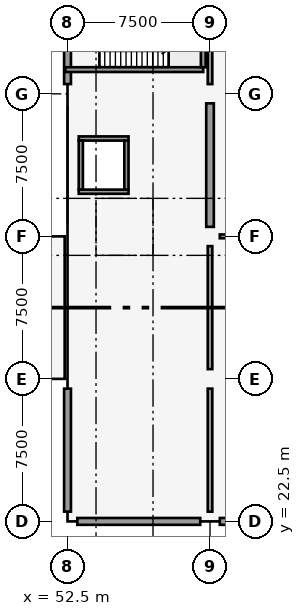
"""IFC4 building model, lengths in metres.
Left out: names, types, materials, properties, quantities, classifications, styles, units other than length and angle.
Written with IfcOpenShell. Run it as: python <this file> out.ifc"""

import sys

from ifc_helpers import new_model, si_unit, direction, frame, frame_2d, origin, origin_2d, place, context, subcontext, project, spatial, rectangle, extrude, element, fill, save


model = new_model("IFC4")
c1 = context("Model", 3, precision=1e-05, world=origin(), true_north=direction((0.0, 1.0)))
c2 = subcontext(c1, "Body", "Model", "MODEL_VIEW")
j1 = project(units=[si_unit("LENGTHUNIT", "METRE"), si_unit("PLANEANGLEUNIT", "RADIAN")], contexts=[c1])
p1 = place(None, origin())
s1 = spatial("IfcSite", under=j1, at=p1, CompositionType="ELEMENT")
p2 = place(p1, origin())
s2 = spatial("IfcBuilding", under=s1, at=p2, CompositionType="ELEMENT")
p3 = place(p2, origin())
s3 = spatial("IfcBuildingStorey", under=s2, at=p3, CompositionType="ELEMENT", Elevation=0.0)
for number, where, z_axis, x_axis in (
    (1, (52.5, 22.5, 0.0), (0.0, 0.0, 1.0), (1.0, 0.0, 0.0)),
    (2, (52.5, 30.0, 0.0), (0.0, 0.0, 1.0), (1.0, 0.0, 0.0)),
    (3, (52.5, 37.5, 0.0), (0.0, 0.0, 1.0), (1.0, 0.0, 0.0)),
    (4, (52.5, 45.0, 0.0), (0.0, 0.0, 1.0), (1.0, 0.0, 0.0)),
    (5, (60.0, 22.5, 0.0), (0.0, 0.0, 1.0), (1.0, 0.0, 0.0)),
    (6, (60.0, 30.0, 0.0), (0.0, 0.0, 1.0), (1.0, 0.0, 0.0)),
    (7, (60.0, 37.5, 0.0), (0.0, 0.0, 1.0), (1.0, 0.0, 0.0)),
    (8, (60.0, 45.0, 0.0), (0.0, 0.0, 1.0), (1.0, 0.0, 0.0)),
):
    element("IfcColumn", number, at=place(p3, frame(where, z_axis=z_axis, x_axis=x_axis)), inside=s3, PredefinedType="COLUMN", context=c2, shape_type="SweptSolid", body=[
        extrude(rectangle(XDim=1.0, YDim=1.0, at=origin_2d()), origin(), (0.0, 0.0, 1.0), 4.8),
    ])
p4 = place(p3, frame((60.0, 38.0, 0.0), z_axis=(0.0, 0.0, 1.0), x_axis=(0.0, 1.0, 0.0)))
e9 = element("IfcWall", 9, at=p4, inside=s3, PredefinedType="SHEAR", context=c2, shape_type="SweptSolid", body=[
    extrude(rectangle(XDim=6.5, YDim=0.4, at=frame_2d((3.25, 0.0))), origin(), (0.0, 0.0, 1.0), 3.0),
])
p5 = place(p3, frame((53.015, 22.5, 0.0), z_axis=(0.0, 0.0, 1.0), x_axis=(1.0, 0.0, 0.0)))
e10 = element("IfcWall", 10, at=p5, inside=s3, PredefinedType="SOLIDWALL", context=c2, shape_type="SweptSolid", body=[
    extrude(rectangle(XDim=6.47, YDim=0.36, at=frame_2d((3.235, 0.0))), origin(), (0.0, 0.0, 1.0), 3.72),
])
p6 = place(p5, frame((2.235, 0.0, 0.0)))
e11 = element("IfcOpeningElement", 11, at=p6, cuts=e10, PredefinedType="OPENING", context=c2, shape_type="SweptSolid", body=[
    extrude(rectangle(XDim=2.0, YDim=2.2, at=frame_2d((1.0, 1.1))), frame((0.0, 0.19, 0.0), z_axis=(0.0, -1.0, 0.0), x_axis=(1.0, 0.0, 0.0)), (0.0, 0.0, 1.0), 0.38),
])
p7 = place(p3, frame((60.515, 22.5, 0.0), z_axis=(0.0, 0.0, 1.0), x_axis=(1.0, 0.0, 0.0)))
e12 = element("IfcWall", 12, at=p7, inside=s3, PredefinedType="SOLIDWALL", context=c2, shape_type="SweptSolid", body=[
    extrude(rectangle(XDim=6.52, YDim=0.36, at=frame_2d((3.26, 0.0))), origin(), (0.0, 0.0, 1.0), 3.72),
])
p8 = place(p7, frame((2.235, 0.0, 0.0)))
e13 = element("IfcOpeningElement", 13, at=p8, cuts=e12, PredefinedType="OPENING", context=c2, shape_type="SweptSolid", body=[
    extrude(rectangle(XDim=2.0, YDim=2.2, at=frame_2d((1.0, 1.1))), frame((0.0, 0.19, 0.0), z_axis=(0.0, -1.0, 0.0), x_axis=(1.0, 0.0, 0.0)), (0.0, 0.0, 1.0), 0.38),
])
p9 = place(p3, frame((52.5, 23.015, 0.0), z_axis=(0.0, 0.0, 1.0), x_axis=(0.0, 1.0, 0.0)))
e14 = element("IfcWall", 14, at=p9, inside=s3, PredefinedType="SOLIDWALL", context=c2, shape_type="SweptSolid", body=[
    extrude(rectangle(XDim=6.47, YDim=0.36, at=frame_2d((3.235, 0.0))), origin(), (0.0, 0.0, 1.0), 3.42),
])
p10 = place(p9, frame((1.12, 0.0, 0.6)))
e15 = element("IfcOpeningElement", 15, at=p10, cuts=e14, PredefinedType="OPENING", context=c2, shape_type="SweptSolid", body=[
    extrude(rectangle(XDim=1.1, YDim=1.8, at=frame_2d((0.55, 0.9))), frame((0.0, 0.19, 0.0), z_axis=(0.0, -1.0, 0.0), x_axis=(1.0, 0.0, 0.0)), (0.0, 0.0, 1.0), 0.38),
])
p11 = place(p9, frame((4.15, 0.0, 0.6)))
e16 = element("IfcOpeningElement", 16, at=p11, cuts=e14, PredefinedType="OPENING", context=c2, shape_type="SweptSolid", body=[
    extrude(rectangle(XDim=1.3, YDim=1.3, at=frame_2d((0.65, 0.65))), frame((0.0, 0.19, 0.0), z_axis=(0.0, -1.0, 0.0), x_axis=(1.0, 0.0, 0.0)), (0.0, 0.0, 1.0), 0.38),
])
p12 = place(p3, frame((52.5, 45.515, 0.0), z_axis=(0.0, 0.0, 1.0), x_axis=(0.0, 1.0, 0.0)))
e17 = element("IfcWall", 17, at=p12, inside=s3, PredefinedType="SOLIDWALL", context=c2, shape_type="SweptSolid", body=[
    extrude(rectangle(XDim=6.47, YDim=0.36, at=frame_2d((3.235, 0.0))), origin(), (0.0, 0.0, 1.0), 3.67),
])
p13 = place(p12, frame((2.022, 0.0, 0.0)))
e18 = element("IfcOpeningElement", 18, at=p13, cuts=e17, PredefinedType="OPENING", context=c2, shape_type="SweptSolid", body=[
    extrude(rectangle(XDim=1.8, YDim=2.2, at=frame_2d((0.9, 1.1))), frame((0.0, 0.19, 0.0), z_axis=(0.0, -1.0, 0.0), x_axis=(1.0, 0.0, 0.0)), (0.0, 0.0, 1.0), 0.38),
])
p14 = place(p3, frame((52.38, 46.275, 0.0), z_axis=(0.0, 0.0, 1.0), x_axis=(1.0, 0.0, 0.0)))
e19 = element("IfcWall", 19, at=p14, inside=s3, PredefinedType="SOLIDWALL", context=c2, shape_type="SweptSolid", body=[
    extrude(rectangle(XDim=7.26, YDim=0.25, at=frame_2d((3.63, 0.0))), origin(), (0.0, 0.0, 1.0), 4.5),
])
p15 = place(p14, frame((0.62, 0.0, 0.0)))
e20 = element("IfcOpeningElement", 20, at=p15, cuts=e19, PredefinedType="OPENING", context=c2, shape_type="SweptSolid", body=[
    extrude(rectangle(XDim=1.1, YDim=2.15, at=frame_2d((0.55, 1.075))), frame((0.0, 0.135, 0.0), z_axis=(0.0, -1.0, 0.0), x_axis=(1.0, 0.0, 0.0)), (0.0, 0.0, 1.0), 0.27),
])
p16 = place(p3, frame((59.645, 46.4, 0.0), z_axis=(0.0, 0.0, 1.0), x_axis=(0.0, 1.0, 0.0)))
e21 = element("IfcWall", 21, at=p16, inside=s3, PredefinedType="SOLIDWALL", context=c2, shape_type="SweptSolid", body=[
    extrude(rectangle(XDim=3.56, YDim=0.25, at=frame_2d((1.78, 0.0))), origin(), (0.0, 0.0, 1.0), 4.5),
])
for number, where, z_axis, x_axis in (
    (22, (53.09, 39.85, 0.0), (0.0, 0.0, 1.0), (1.0, 0.0, 0.0)),
    (23, (53.09, 42.65, 0.0), (0.0, 0.0, 1.0), (1.0, 0.0, 0.0)),
):
    element("IfcWall", number, at=place(p3, frame(where, z_axis=z_axis, x_axis=x_axis)), inside=s3, PredefinedType="SOLIDWALL", context=c2, shape_type="SweptSolid", body=[
        extrude(rectangle(XDim=2.62, YDim=0.22, at=frame_2d((1.31, 0.0))), origin(), (0.0, 0.0, 1.0), 4.5),
    ])
p17 = place(p3, frame((53.2, 39.96, 0.0), z_axis=(0.0, 0.0, 1.0), x_axis=(0.0, 1.0, 0.0)))
e24 = element("IfcWall", 24, at=p17, inside=s3, PredefinedType="SOLIDWALL", context=c2, shape_type="SweptSolid", body=[
    extrude(rectangle(XDim=2.58, YDim=0.22, at=frame_2d((1.29, 0.0))), origin(), (0.0, 0.0, 1.0), 4.5),
])
p18 = place(p3, frame((55.6, 39.96, 0.0), z_axis=(0.0, 0.0, 1.0), x_axis=(0.0, 1.0, 0.0)))
e25 = element("IfcWall", 25, at=p18, inside=s3, PredefinedType="SOLIDWALL", context=c2, shape_type="SweptSolid", body=[
    extrude(rectangle(XDim=2.58, YDim=0.22, at=frame_2d((1.29, 0.0))), origin(), (0.0, 0.0, 1.0), 4.5),
])
p19 = place(p18, frame((0.79, 0.0, 0.0)))
e26 = element("IfcOpeningElement", 26, at=p19, cuts=e25, PredefinedType="OPENING", context=c2, shape_type="SweptSolid", body=[
    extrude(rectangle(XDim=1.0, YDim=2.15, at=frame_2d((0.5, 1.075))), frame((0.0, 0.12, 0.0), z_axis=(0.0, -1.0, 0.0), x_axis=(1.0, 0.0, 0.0)), (0.0, 0.0, 1.0), 0.24),
])
p20 = place(p3, frame((60.514, 37.5, 0.0), z_axis=(0.0, 0.0, 1.0), x_axis=(1.0, 0.0, 0.0)))
e27 = element("IfcWall", 27, at=p20, inside=s3, PredefinedType="PARTITIONING", context=c2, shape_type="SweptSolid", body=[
    extrude(rectangle(XDim=14.022, YDim=0.2, at=frame_2d((7.011, 0.0))), origin(), (0.0, 0.0, 1.0), 2.97),
])
p21 = place(p20, frame((2.336, 0.0, 0.0)))
e28 = element("IfcOpeningElement", 28, at=p21, cuts=e27, PredefinedType="OPENING", context=c2, shape_type="SweptSolid", body=[
    extrude(rectangle(XDim=1.8, YDim=2.18, at=frame_2d((0.9, 1.09))), frame((0.0, 0.11, 0.0), z_axis=(0.0, -1.0, 0.0), x_axis=(1.0, 0.0, 0.0)), (0.0, 0.0, 1.0), 0.22),
])
p22 = place(p3, frame((60.0, 23.014, 0.0), z_axis=(0.0, 0.0, 1.0), x_axis=(0.0, 1.0, 0.0)))
e29 = element("IfcWall", 29, at=p22, inside=s3, PredefinedType="PARTITIONING", context=c2, shape_type="SweptSolid", body=[
    extrude(rectangle(XDim=6.472, YDim=0.24, at=frame_2d((3.236, 0.0))), origin(), (0.0, 0.0, 1.0), 3.42),
])
p23 = place(p22, frame((2.486, 0.0, 0.0)))
e30 = element("IfcOpeningElement", 30, at=p23, cuts=e29, PredefinedType="OPENING", context=c2, shape_type="SweptSolid", body=[
    extrude(rectangle(XDim=1.5, YDim=2.16, at=frame_2d((0.75, 1.08))), frame((0.0, 0.13, 0.0), z_axis=(0.0, -1.0, 0.0), x_axis=(1.0, 0.0, 0.0)), (0.0, 0.0, 1.0), 0.26),
])
p24 = place(p3, frame((60.0, 30.514, 0.0), z_axis=(0.0, 0.0, 1.0), x_axis=(0.0, 1.0, 0.0)))
e31 = element("IfcWall", 31, at=p24, inside=s3, PredefinedType="PARTITIONING", context=c2, shape_type="SweptSolid", body=[
    extrude(rectangle(XDim=6.472, YDim=0.24, at=frame_2d((3.236, 0.0))), origin(), (0.0, 0.0, 1.0), 2.97),
])
p25 = place(p24, frame((2.336, 0.0, 0.0)))
e32 = element("IfcOpeningElement", 32, at=p25, cuts=e31, PredefinedType="OPENING", context=c2, shape_type="SweptSolid", body=[
    extrude(rectangle(XDim=1.8, YDim=2.16, at=frame_2d((0.9, 1.08))), frame((0.0, 0.13, 0.0), z_axis=(0.0, -1.0, 0.0), x_axis=(1.0, 0.0, 0.0)), (0.0, 0.0, 1.0), 0.26),
])
p26 = place(p3, frame((60.0, 45.514, 0.0), z_axis=(0.0, 0.0, 1.0), x_axis=(0.0, 1.0, 0.0)))
e33 = element("IfcWall", 33, at=p26, inside=s3, PredefinedType="PARTITIONING", context=c2, shape_type="SweptSolid", body=[
    extrude(rectangle(XDim=6.472, YDim=0.24, at=frame_2d((3.236, 0.0))), origin(), (0.0, 0.0, 1.0), 2.97),
])
p27 = place(p6, frame((2.0, 0.0, 0.0), z_axis=(0.0, 0.0, 1.0), x_axis=(-1.0, 0.0, 0.0)))
e34 = element("IfcDoor", 34, at=p27, inside=s3, OperationType="SINGLE_SWING_LEFT", PredefinedType="DOOR", context=c2, shape_type="SweptSolid", body=[
    extrude(rectangle(XDim=2.0, YDim=2.2, at=frame_2d((1.0, 1.1))), frame((0.0, 0.025, 0.0), z_axis=(0.0, -1.0, 0.0), x_axis=(1.0, 0.0, 0.0)), (0.0, 0.0, 1.0), 0.05),
])
fill(e11, e34)
p28 = place(p10, origin())
e35 = element("IfcWindow", 35, at=p28, inside=s3, PartitioningType="SINGLE_PANEL", PredefinedType="WINDOW", context=c2, shape_type="SweptSolid", body=[
    extrude(rectangle(XDim=1.1, YDim=1.8, at=frame_2d((0.55, 0.9))), frame((0.0, 0.03, 0.0), z_axis=(0.0, -1.0, 0.0), x_axis=(1.0, 0.0, 0.0)), (0.0, 0.0, 1.0), 0.06),
])
fill(e15, e35)
p29 = place(p11, origin())
e36 = element("IfcWindow", 36, at=p29, inside=s3, PartitioningType="SINGLE_PANEL", PredefinedType="WINDOW", context=c2, shape_type="SweptSolid", body=[
    extrude(rectangle(XDim=1.3, YDim=1.3, at=frame_2d((0.65, 0.65))), frame((0.0, 0.03, 0.0), z_axis=(0.0, -1.0, 0.0), x_axis=(1.0, 0.0, 0.0)), (0.0, 0.0, 1.0), 0.06),
])
fill(e16, e36)
p30 = place(p15, origin())
e37 = element("IfcDoor", 37, at=p30, inside=s3, OperationType="SINGLE_SWING_LEFT", PredefinedType="DOOR", context=c2, shape_type="SweptSolid", body=[
    extrude(rectangle(XDim=1.1, YDim=2.15, at=frame_2d((0.55, 1.075))), frame((0.0, 0.025, 0.0), z_axis=(0.0, -1.0, 0.0), x_axis=(1.0, 0.0, 0.0)), (0.0, 0.0, 1.0), 0.05),
])
fill(e20, e37)
p31 = place(p19, origin())
e38 = element("IfcDoor", 38, at=p31, inside=s3, OperationType="SLIDING_TO_LEFT", PredefinedType="DOOR", context=c2, shape_type="SweptSolid", body=[
    extrude(rectangle(XDim=1.0, YDim=2.15, at=frame_2d((0.5, 1.075))), frame((0.0, 0.025, 0.0), z_axis=(0.0, -1.0, 0.0), x_axis=(1.0, 0.0, 0.0)), (0.0, 0.0, 1.0), 0.05),
])
fill(e26, e38)
p32 = place(p23, origin())
e39 = element("IfcDoor", 39, at=p32, inside=s3, OperationType="SINGLE_SWING_RIGHT", PredefinedType="DOOR", context=c2, shape_type="SweptSolid", body=[
    extrude(rectangle(XDim=1.5, YDim=2.16, at=frame_2d((0.75, 1.08))), frame((0.0, 0.025, 0.0), z_axis=(0.0, -1.0, 0.0), x_axis=(1.0, 0.0, 0.0)), (0.0, 0.0, 1.0), 0.05),
])
fill(e30, e39)
p33 = place(p25, origin())
e40 = element("IfcDoor", 40, at=p33, inside=s3, OperationType="SINGLE_SWING_LEFT", PredefinedType="DOOR", context=c2, shape_type="SweptSolid", body=[
    extrude(rectangle(XDim=1.8, YDim=2.16, at=frame_2d((0.9, 1.08))), frame((0.0, 0.025, 0.0), z_axis=(0.0, -1.0, 0.0), x_axis=(1.0, 0.0, 0.0)), (0.0, 0.0, 1.0), 0.05),
])
fill(e32, e40)
save(model, sys.argv[1])
